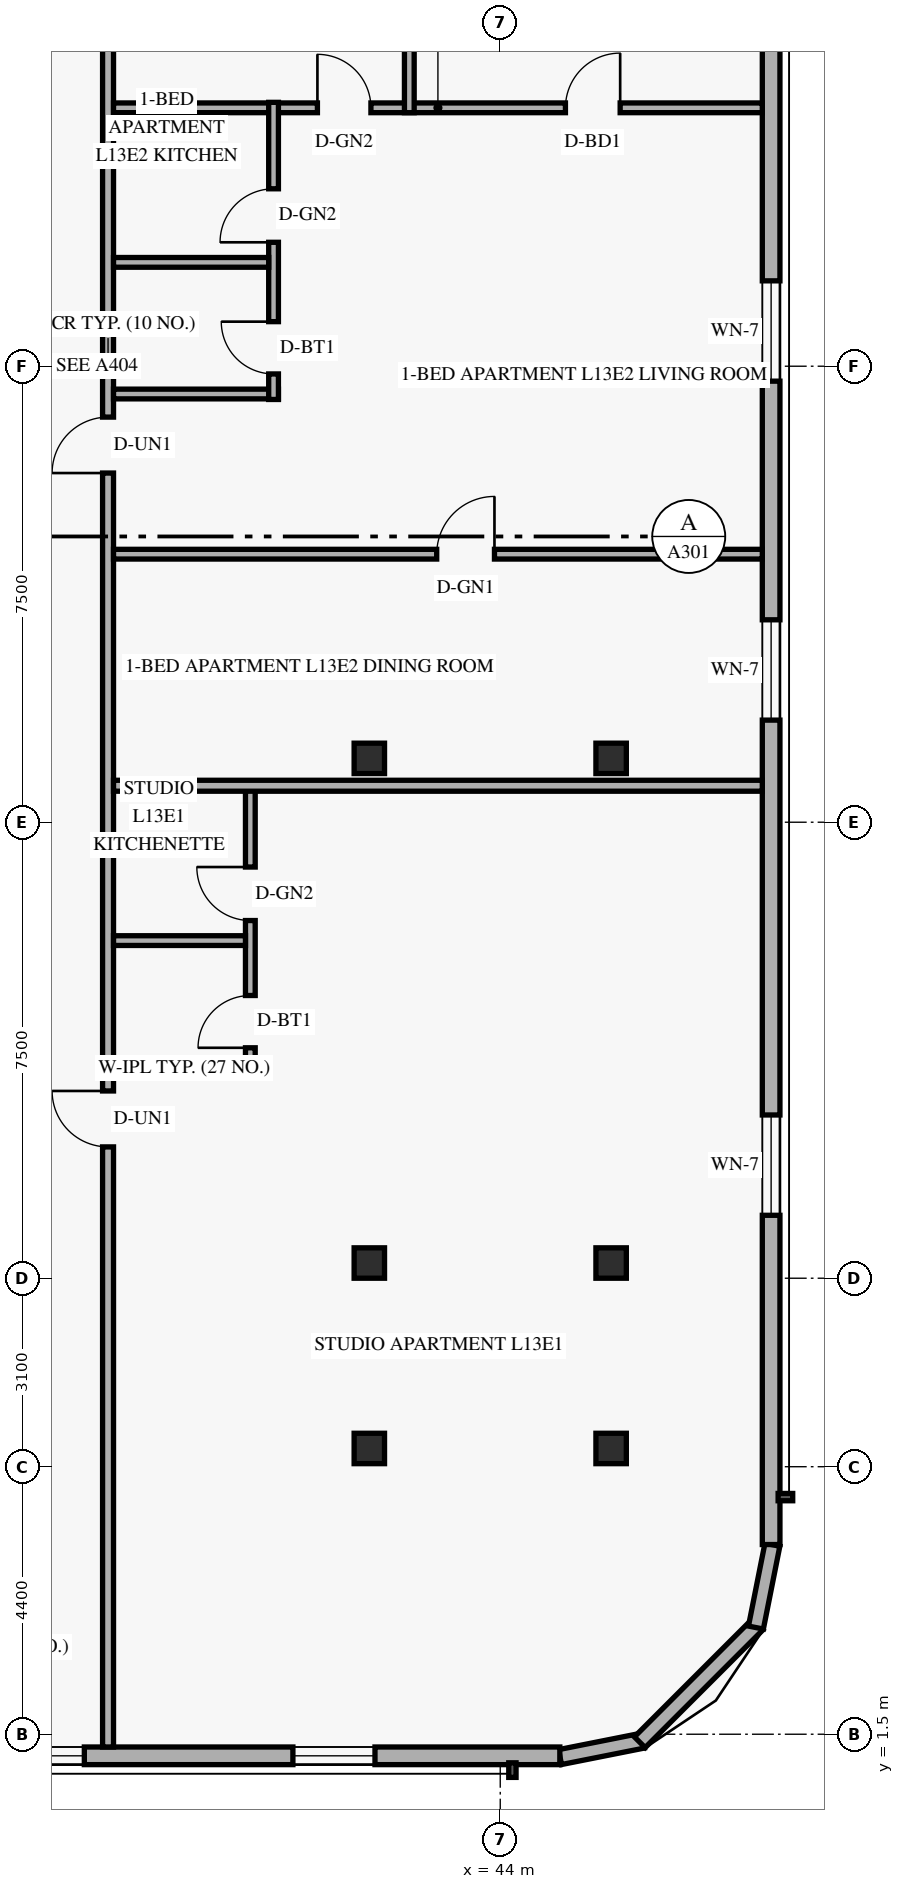
"""IFC4 building model, lengths in metres.
Left out: names, types, materials, properties, quantities, classifications, styles, units other than length and angle.
Written with IfcOpenShell. Run it as: python <this file> out.ifc"""

import sys

from ifc_helpers import new_model, si_unit, direction, frame, frame_2d, origin, origin_2d, place, context, subcontext, project, spatial, rectangle, hollow_rectangle, extrude, element, fill, save


model = new_model("IFC4")
c1 = context("Model", 3, precision=1e-05, world=origin(), true_north=direction((0.0, 1.0)))
c2 = subcontext(c1, "Body", "Model", "MODEL_VIEW")
j1 = project(units=[si_unit("LENGTHUNIT", "METRE"), si_unit("PLANEANGLEUNIT", "RADIAN")], contexts=[c1])
p1 = place(None, origin())
s1 = spatial("IfcSite", under=j1, at=p1, CompositionType="ELEMENT")
p2 = place(p1, origin())
s2 = spatial("IfcBuilding", under=s1, at=p2, CompositionType="ELEMENT")
p3 = place(p2, frame((0.0, 0.0, 52.8)))
s3 = spatial("IfcBuildingStorey", under=s2, at=p3, CompositionType="ELEMENT", Elevation=52.8)
for number, where, z_axis, x_axis in (
    (1, (41.784, 6.2, 0.0), (0.035, 0.0, 0.999), (0.0, 1.0, 0.0)),
    (2, (41.784, 9.25, 0.0), (0.035, 0.0, 0.999), (0.0, 1.0, 0.0)),
    (3, (41.784, 17.55, 0.0), (0.035, 0.0, 0.999), (0.0, 1.0, 0.0)),
):
    element("IfcColumn", number, at=place(p3, frame(where, z_axis=z_axis, x_axis=x_axis)), inside=s3, PredefinedType="COLUMN", context=c2, shape_type="SweptSolid", body=[
        extrude(hollow_rectangle(XDim=0.5, YDim=0.5, WallThickness=0.022, at=origin_2d()), origin(), (0.0, 0.0, 1.0), 3.602),
    ])
for number, where, z_axis, x_axis in (
    (4, (45.719, 6.2, 0.0), (0.058, 0.0, 0.998), (0.0, 1.0, 0.0)),
    (5, (45.719, 9.25, 0.0), (0.058, 0.0, 0.998), (0.0, 1.0, 0.0)),
    (6, (45.719, 17.55, 0.0), (0.058, 0.0, 0.998), (0.0, 1.0, 0.0)),
):
    element("IfcColumn", number, at=place(p3, frame(where, z_axis=z_axis, x_axis=x_axis)), inside=s3, PredefinedType="COLUMN", context=c2, shape_type="SweptSolid", body=[
        extrude(hollow_rectangle(XDim=0.5, YDim=0.5, WallThickness=0.022, at=origin_2d()), origin(), (0.0, 0.0, 1.0), 3.606),
    ])
p4 = place(p3, frame((44.983, 1.124, 0.0), z_axis=(0.0, 0.0, 1.0), x_axis=(0.980809899341, 0.19496651342, 0.0)))
e7 = element("IfcWall", 7, at=p4, inside=s3, PredefinedType="SOLIDWALL", context=c2, shape_type="SweptSolid", body=[
    extrude(rectangle(XDim=1.389, YDim=0.25, at=frame_2d((0.694, 0.0))), origin(), (0.0, 0.0, 1.0), 3.36),
])
p5 = place(p3, frame((46.295, 1.368, 0.0), z_axis=(0.0, 0.0, 1.0), x_axis=(0.707106781187, 0.707106781187, 0.0)))
e8 = element("IfcWall", 8, at=p5, inside=s3, PredefinedType="SOLIDWALL", context=c2, shape_type="SweptSolid", body=[
    extrude(rectangle(XDim=2.739, YDim=0.25, at=frame_2d((1.37, 0.0))), origin(), (0.0, 0.0, 1.0), 3.36),
])
p6 = place(p3, frame((48.205, 3.254, 0.0), z_axis=(0.0, 0.0, 1.0), x_axis=(0.19496651342, 0.980809899341, 0.0)))
e9 = element("IfcWall", 9, at=p6, inside=s3, PredefinedType="SOLIDWALL", context=c2, shape_type="SweptSolid", body=[
    extrude(rectangle(XDim=1.389, YDim=0.25, at=frame_2d((0.694, 0.0))), origin(), (0.0, 0.0, 1.0), 3.36),
])
p7 = place(p3, frame((5.42, 1.145, 0.0), z_axis=(0.0, 0.0, 1.0), x_axis=(1.0, 0.0, 0.0)))
e10 = element("IfcWall", 10, at=p7, inside=s3, PredefinedType="SOLIDWALL", context=c2, shape_type="SweptSolid", body=[
    extrude(rectangle(XDim=39.56, YDim=0.29, at=frame_2d((19.78, 0.0))), origin(), (0.0, 0.0, 1.0), 3.36),
])
p8 = place(p7, frame((2.765, 0.0, 0.85)))
e11 = element("IfcOpeningElement", 11, at=p8, cuts=e10, PredefinedType="OPENING", context=c2, shape_type="SweptSolid", body=[
    extrude(rectangle(XDim=1.35, YDim=1.55, at=frame_2d((0.675, 0.775))), frame((0.0, 0.155, 0.0), z_axis=(0.0, -1.0, 0.0), x_axis=(1.0, 0.0, 0.0)), (0.0, 0.0, 1.0), 0.31),
])
p9 = place(p7, frame((7.18, 0.0, 0.85)))
e12 = element("IfcOpeningElement", 12, at=p9, cuts=e10, PredefinedType="OPENING", context=c2, shape_type="SweptSolid", body=[
    extrude(rectangle(XDim=1.2, YDim=1.5, at=frame_2d((0.6, 0.75))), frame((0.0, 0.155, 0.0), z_axis=(0.0, -1.0, 0.0), x_axis=(1.0, 0.0, 0.0)), (0.0, 0.0, 1.0), 0.31),
])
p10 = place(p7, frame((12.482, 0.0, 0.85)))
e13 = element("IfcOpeningElement", 13, at=p10, cuts=e10, PredefinedType="OPENING", context=c2, shape_type="SweptSolid", body=[
    extrude(rectangle(XDim=1.35, YDim=1.55, at=frame_2d((0.675, 0.775))), frame((0.0, 0.155, 0.0), z_axis=(0.0, -1.0, 0.0), x_axis=(1.0, 0.0, 0.0)), (0.0, 0.0, 1.0), 0.31),
])
p11 = place(p7, frame((21.072, 0.0, 0.85)))
e14 = element("IfcOpeningElement", 14, at=p11, cuts=e10, PredefinedType="OPENING", context=c2, shape_type="SweptSolid", body=[
    extrude(rectangle(XDim=1.35, YDim=1.55, at=frame_2d((0.675, 0.775))), frame((0.0, 0.155, 0.0), z_axis=(0.0, -1.0, 0.0), x_axis=(1.0, 0.0, 0.0)), (0.0, 0.0, 1.0), 0.31),
])
p12 = place(p7, frame((27.255, 0.0, 0.85)))
e15 = element("IfcOpeningElement", 15, at=p12, cuts=e10, PredefinedType="OPENING", context=c2, shape_type="SweptSolid", body=[
    extrude(rectangle(XDim=1.35, YDim=1.55, at=frame_2d((0.675, 0.775))), frame((0.0, 0.155, 0.0), z_axis=(0.0, -1.0, 0.0), x_axis=(1.0, 0.0, 0.0)), (0.0, 0.0, 1.0), 0.31),
])
p13 = place(p7, frame((30.39, 0.0, 0.85)))
e16 = element("IfcOpeningElement", 16, at=p13, cuts=e10, PredefinedType="OPENING", context=c2, shape_type="SweptSolid", body=[
    extrude(rectangle(XDim=1.35, YDim=1.55, at=frame_2d((0.675, 0.775))), frame((0.0, 0.155, 0.0), z_axis=(0.0, -1.0, 0.0), x_axis=(1.0, 0.0, 0.0)), (0.0, 0.0, 1.0), 0.31),
])
p14 = place(p7, frame((35.17, 0.0, 0.85)))
e17 = element("IfcOpeningElement", 17, at=p14, cuts=e10, PredefinedType="OPENING", context=c2, shape_type="SweptSolid", body=[
    extrude(rectangle(XDim=1.35, YDim=1.55, at=frame_2d((0.675, 0.775))), frame((0.0, 0.155, 0.0), z_axis=(0.0, -1.0, 0.0), x_axis=(1.0, 0.0, 0.0)), (0.0, 0.0, 1.0), 0.31),
])
p15 = place(p3, frame((48.455, 4.62, 0.0), z_axis=(0.0, 0.0, 1.0), x_axis=(0.0, 1.0, 0.0)))
e18 = element("IfcWall", 18, at=p15, inside=s3, PredefinedType="SOLIDWALL", context=c2, shape_type="SweptSolid", body=[
    extrude(rectangle(XDim=38.76, YDim=0.29, at=frame_2d((19.38, 0.0))), origin(), (0.0, 0.0, 1.0), 3.36),
])
p16 = place(p15, frame((5.415, 0.0, 0.85)))
e19 = element("IfcOpeningElement", 19, at=p16, cuts=e18, PredefinedType="OPENING", context=c2, shape_type="SweptSolid", body=[
    extrude(rectangle(XDim=1.65, YDim=1.6, at=frame_2d((0.825, 0.8))), frame((0.0, 0.155, 0.0), z_axis=(0.0, -1.0, 0.0), x_axis=(1.0, 0.0, 0.0)), (0.0, 0.0, 1.0), 0.31),
])
p17 = place(p15, frame((13.559, 0.0, 0.85)))
e20 = element("IfcOpeningElement", 20, at=p17, cuts=e18, PredefinedType="OPENING", context=c2, shape_type="SweptSolid", body=[
    extrude(rectangle(XDim=1.65, YDim=1.6, at=frame_2d((0.825, 0.8))), frame((0.0, 0.155, 0.0), z_axis=(0.0, -1.0, 0.0), x_axis=(1.0, 0.0, 0.0)), (0.0, 0.0, 1.0), 0.31),
])
p18 = place(p15, frame((19.134, 0.0, 0.85)))
e21 = element("IfcOpeningElement", 21, at=p18, cuts=e18, PredefinedType="OPENING", context=c2, shape_type="SweptSolid", body=[
    extrude(rectangle(XDim=1.65, YDim=1.6, at=frame_2d((0.825, 0.8))), frame((0.0, 0.155, 0.0), z_axis=(0.0, -1.0, 0.0), x_axis=(1.0, 0.0, 0.0)), (0.0, 0.0, 1.0), 0.31),
])
p19 = place(p15, frame((25.05, 0.0, 0.85)))
e22 = element("IfcOpeningElement", 22, at=p19, cuts=e18, PredefinedType="OPENING", context=c2, shape_type="SweptSolid", body=[
    extrude(rectangle(XDim=1.65, YDim=1.6, at=frame_2d((0.825, 0.8))), frame((0.0, 0.155, 0.0), z_axis=(0.0, -1.0, 0.0), x_axis=(1.0, 0.0, 0.0)), (0.0, 0.0, 1.0), 0.31),
])
p20 = place(p15, frame((28.764, 0.0, 0.85)))
e23 = element("IfcOpeningElement", 23, at=p20, cuts=e18, PredefinedType="OPENING", context=c2, shape_type="SweptSolid", body=[
    extrude(rectangle(XDim=1.65, YDim=1.6, at=frame_2d((0.825, 0.8))), frame((0.0, 0.155, 0.0), z_axis=(0.0, -1.0, 0.0), x_axis=(1.0, 0.0, 0.0)), (0.0, 0.0, 1.0), 0.31),
])
p21 = place(p15, frame((33.824, 0.0, 0.85)))
e24 = element("IfcOpeningElement", 24, at=p21, cuts=e18, PredefinedType="OPENING", context=c2, shape_type="SweptSolid", body=[
    extrude(rectangle(XDim=1.65, YDim=1.6, at=frame_2d((0.825, 0.8))), frame((0.0, 0.155, 0.0), z_axis=(0.0, -1.0, 0.0), x_axis=(1.0, 0.0, 0.0)), (0.0, 0.0, 1.0), 0.31),
])
p22 = place(p3, frame((37.55, 1.29, 0.0), z_axis=(0.0, 0.0, 1.0), x_axis=(0.0, 1.0, 0.0)))
e25 = element("IfcWall", 25, at=p22, inside=s3, PredefinedType="STANDARD", context=c2, shape_type="SweptSolid", body=[
    extrude(rectangle(XDim=45.42, YDim=0.18, at=frame_2d((22.71, 0.0))), origin(), (0.0, 0.0, 1.0), 2.649),
])
p23 = place(p22, frame((9.87, 0.0, 0.0)))
e26 = element("IfcOpeningElement", 26, at=p23, cuts=e25, PredefinedType="OPENING", context=c2, shape_type="SweptSolid", body=[
    extrude(rectangle(XDim=0.92, YDim=2.15, at=frame_2d((0.46, 1.075))), frame((0.0, 0.1, 0.0), z_axis=(0.0, -1.0, 0.0), x_axis=(1.0, 0.0, 0.0)), (0.0, 0.0, 1.0), 0.2),
])
p24 = place(p22, frame((20.953, 0.0, 0.0)))
e27 = element("IfcOpeningElement", 27, at=p24, cuts=e25, PredefinedType="OPENING", context=c2, shape_type="SweptSolid", body=[
    extrude(rectangle(XDim=0.92, YDim=2.15, at=frame_2d((0.46, 1.075))), frame((0.0, 0.1, 0.0), z_axis=(0.0, -1.0, 0.0), x_axis=(1.0, 0.0, 0.0)), (0.0, 0.0, 1.0), 0.2),
])
p25 = place(p22, frame((35.534, 0.0, 0.0)))
e28 = element("IfcOpeningElement", 28, at=p25, cuts=e25, PredefinedType="OPENING", context=c2, shape_type="SweptSolid", body=[
    extrude(rectangle(XDim=0.92, YDim=2.15, at=frame_2d((0.46, 1.075))), frame((0.0, 0.1, 0.0), z_axis=(0.0, -1.0, 0.0), x_axis=(1.0, 0.0, 0.0)), (0.0, 0.0, 1.0), 0.2),
])
p26 = place(p3, frame((37.64, 12.46, 0.0), z_axis=(0.0, 0.0, 1.0), x_axis=(1.0, 0.0, 0.0)))
e29 = element("IfcWall", 29, at=p26, inside=s3, PredefinedType="PLUMBINGWALL", context=c2, shape_type="SweptSolid", body=[
    extrude(rectangle(XDim=2.33, YDim=0.16, at=frame_2d((1.165, 0.0))), origin(), (0.0, 0.0, 1.0), 3.36),
])
p27 = place(p3, frame((39.89, 12.37, 0.0), z_axis=(0.0, 0.0, 1.0), x_axis=(0.0, 1.0, 0.0)))
e30 = element("IfcWall", 30, at=p27, inside=s3, PredefinedType="PLUMBINGWALL", context=c2, shape_type="SweptSolid", body=[
    extrude(rectangle(XDim=4.73, YDim=0.16, at=frame_2d((2.365, 0.0))), origin(), (0.0, 0.0, 1.0), 2.932),
])
p28 = place(p27, frame((0.42, 0.0, 0.0)))
e31 = element("IfcOpeningElement", 31, at=p28, cuts=e30, PredefinedType="OPENING", context=c2, shape_type="SweptSolid", body=[
    extrude(rectangle(XDim=0.86, YDim=2.12, at=frame_2d((0.43, 1.06))), frame((0.0, 0.09, 0.0), z_axis=(0.0, -1.0, 0.0), x_axis=(1.0, 0.0, 0.0)), (0.0, 0.0, 1.0), 0.18),
])
p29 = place(p27, frame((2.513, 0.0, 0.0)))
e32 = element("IfcOpeningElement", 32, at=p29, cuts=e30, PredefinedType="OPENING", context=c2, shape_type="SweptSolid", body=[
    extrude(rectangle(XDim=0.88, YDim=2.12, at=frame_2d((0.44, 1.06))), frame((0.0, 0.09, 0.0), z_axis=(0.0, -1.0, 0.0), x_axis=(1.0, 0.0, 0.0)), (0.0, 0.0, 1.0), 0.18),
])
p30 = place(p3, frame((37.64, 14.553, 0.0), z_axis=(0.0, 0.0, 1.0), x_axis=(1.0, 0.0, 0.0)))
e33 = element("IfcWall", 33, at=p30, inside=s3, PredefinedType="PLUMBINGWALL", context=c2, shape_type="SweptSolid", body=[
    extrude(rectangle(XDim=2.17, YDim=0.16, at=frame_2d((1.085, 0.0))), origin(), (0.0, 0.0, 1.0), 3.36),
])
p31 = place(p3, frame((37.64, 17.1, 0.0), z_axis=(0.0, 0.0, 1.0), x_axis=(1.0, 0.0, 0.0)))
e34 = element("IfcWall", 34, at=p31, inside=s3, PredefinedType="PARTITIONING", context=c2, shape_type="SweptSolid", body=[
    extrude(rectangle(XDim=10.67, YDim=0.18, at=frame_2d((5.335, 0.0))), origin(), (0.0, 0.0, 1.0), 2.649),
])
p32 = place(p3, frame((37.64, 28.25, 0.0), z_axis=(0.0, 0.0, 1.0), x_axis=(1.0, 0.0, 0.0)))
e35 = element("IfcWall", 35, at=p32, inside=s3, PredefinedType="PARTITIONING", context=c2, shape_type="SweptSolid", body=[
    extrude(rectangle(XDim=10.67, YDim=0.16, at=frame_2d((5.335, 0.0))), origin(), (0.0, 0.0, 1.0), 2.649),
])
p33 = place(p32, frame((3.353, 0.0, 0.0)))
e36 = element("IfcOpeningElement", 36, at=p33, cuts=e35, PredefinedType="OPENING", context=c2, shape_type="SweptSolid", body=[
    extrude(rectangle(XDim=0.88, YDim=2.12, at=frame_2d((0.44, 1.06))), frame((0.0, 0.09, 0.0), z_axis=(0.0, -1.0, 0.0), x_axis=(1.0, 0.0, 0.0)), (0.0, 0.0, 1.0), 0.18),
])
p34 = place(p32, frame((7.432, 0.0, 0.0)))
e37 = element("IfcOpeningElement", 37, at=p34, cuts=e35, PredefinedType="OPENING", context=c2, shape_type="SweptSolid", body=[
    extrude(rectangle(XDim=0.9, YDim=2.14, at=frame_2d((0.45, 1.07))), frame((0.0, 0.09, 0.0), z_axis=(0.0, -1.0, 0.0), x_axis=(1.0, 0.0, 0.0)), (0.0, 0.0, 1.0), 0.18),
])
p35 = place(p3, frame((37.64, 23.543, 0.0), z_axis=(0.0, 0.0, 1.0), x_axis=(1.0, 0.0, 0.0)))
e38 = element("IfcWall", 38, at=p35, inside=s3, PredefinedType="PLUMBINGWALL", context=c2, shape_type="SweptSolid", body=[
    extrude(rectangle(XDim=2.712, YDim=0.16, at=frame_2d((1.356, 0.0))), origin(), (0.0, 0.0, 1.0), 3.36),
])
p36 = place(p3, frame((40.272, 23.453, 0.0), z_axis=(0.0, 0.0, 1.0), x_axis=(0.0, 1.0, 0.0)))
e39 = element("IfcWall", 39, at=p36, inside=s3, PredefinedType="PLUMBINGWALL", context=c2, shape_type="SweptSolid", body=[
    extrude(rectangle(XDim=4.887, YDim=0.16, at=frame_2d((2.444, 0.0))), origin(), (0.0, 0.0, 1.0), 3.36),
])
p37 = place(p36, frame((0.42, 0.0, 0.0)))
e40 = element("IfcOpeningElement", 40, at=p37, cuts=e39, PredefinedType="OPENING", context=c2, shape_type="SweptSolid", body=[
    extrude(rectangle(XDim=0.86, YDim=2.12, at=frame_2d((0.43, 1.06))), frame((0.0, 0.09, 0.0), z_axis=(0.0, -1.0, 0.0), x_axis=(1.0, 0.0, 0.0)), (0.0, 0.0, 1.0), 0.18),
])
p38 = place(p36, frame((2.585, 0.0, 0.0)))
e41 = element("IfcOpeningElement", 41, at=p38, cuts=e39, PredefinedType="OPENING", context=c2, shape_type="SweptSolid", body=[
    extrude(rectangle(XDim=0.88, YDim=2.12, at=frame_2d((0.44, 1.06))), frame((0.0, 0.09, 0.0), z_axis=(0.0, -1.0, 0.0), x_axis=(1.0, 0.0, 0.0)), (0.0, 0.0, 1.0), 0.18),
])
p39 = place(p3, frame((37.64, 25.708, 0.0), z_axis=(0.0, 0.0, 1.0), x_axis=(1.0, 0.0, 0.0)))
e42 = element("IfcWall", 42, at=p39, inside=s3, PredefinedType="PLUMBINGWALL", context=c2, shape_type="SweptSolid", body=[
    extrude(rectangle(XDim=2.552, YDim=0.16, at=frame_2d((1.276, 0.0))), origin(), (0.0, 0.0, 1.0), 3.36),
])
p40 = place(p3, frame((37.64, 20.908, 0.0), z_axis=(0.0, 0.0, 1.0), x_axis=(1.0, 0.0, 0.0)))
e43 = element("IfcWall", 43, at=p40, inside=s3, PredefinedType="PARTITIONING", context=c2, shape_type="SweptSolid", body=[
    extrude(rectangle(XDim=10.67, YDim=0.16, at=frame_2d((5.335, 0.0))), origin(), (0.0, 0.0, 1.0), 2.649),
])
p41 = place(p40, frame((5.315, 0.0, 0.0)))
e44 = element("IfcOpeningElement", 44, at=p41, cuts=e43, PredefinedType="OPENING", context=c2, shape_type="SweptSolid", body=[
    extrude(rectangle(XDim=0.95, YDim=2.15, at=frame_2d((0.475, 1.075))), frame((0.0, 0.09, 0.0), z_axis=(0.0, -1.0, 0.0), x_axis=(1.0, 0.0, 0.0)), (0.0, 0.0, 1.0), 0.18),
])
p42 = place(p3, frame((42.504, 28.17, 0.0), z_axis=(0.0, 0.0, 1.0), x_axis=(0.0, 1.0, 0.0)))
e45 = element("IfcWall", 45, at=p42, inside=s3, PredefinedType="PARTITIONING", context=c2, shape_type="SweptSolid", body=[
    extrude(rectangle(XDim=4.96, YDim=0.16, at=frame_2d((2.48, 0.0))), origin(), (0.0, 0.0, 1.0), 2.649),
])
p43 = place(p13, origin())
e46 = element("IfcWindow", 46, at=p43, inside=s3, PartitioningType="SINGLE_PANEL", PredefinedType="WINDOW", context=c2, shape_type="SweptSolid", body=[
    extrude(rectangle(XDim=1.35, YDim=1.55, at=frame_2d((0.675, 0.775))), frame((0.0, 0.03, 0.0), z_axis=(0.0, -1.0, 0.0), x_axis=(1.0, 0.0, 0.0)), (0.0, 0.0, 1.0), 0.06),
])
fill(e16, e46)
p44 = place(p14, origin())
e47 = element("IfcWindow", 47, at=p44, inside=s3, PartitioningType="SINGLE_PANEL", PredefinedType="WINDOW", context=c2, shape_type="SweptSolid", body=[
    extrude(rectangle(XDim=1.35, YDim=1.55, at=frame_2d((0.675, 0.775))), frame((0.0, 0.03, 0.0), z_axis=(0.0, -1.0, 0.0), x_axis=(1.0, 0.0, 0.0)), (0.0, 0.0, 1.0), 0.06),
])
fill(e17, e47)
p45 = place(p16, origin())
e48 = element("IfcWindow", 48, at=p45, inside=s3, PartitioningType="SINGLE_PANEL", PredefinedType="WINDOW", context=c2, shape_type="SweptSolid", body=[
    extrude(rectangle(XDim=1.65, YDim=1.6, at=frame_2d((0.825, 0.8))), frame((0.0, 0.03, 0.0), z_axis=(0.0, -1.0, 0.0), x_axis=(1.0, 0.0, 0.0)), (0.0, 0.0, 1.0), 0.06),
])
fill(e19, e48)
p46 = place(p17, origin())
e49 = element("IfcWindow", 49, at=p46, inside=s3, PartitioningType="SINGLE_PANEL", PredefinedType="WINDOW", context=c2, shape_type="SweptSolid", body=[
    extrude(rectangle(XDim=1.65, YDim=1.6, at=frame_2d((0.825, 0.8))), frame((0.0, 0.03, 0.0), z_axis=(0.0, -1.0, 0.0), x_axis=(1.0, 0.0, 0.0)), (0.0, 0.0, 1.0), 0.06),
])
fill(e20, e49)
p47 = place(p18, origin())
e50 = element("IfcWindow", 50, at=p47, inside=s3, PartitioningType="SINGLE_PANEL", PredefinedType="WINDOW", context=c2, shape_type="SweptSolid", body=[
    extrude(rectangle(XDim=1.65, YDim=1.6, at=frame_2d((0.825, 0.8))), frame((0.0, 0.03, 0.0), z_axis=(0.0, -1.0, 0.0), x_axis=(1.0, 0.0, 0.0)), (0.0, 0.0, 1.0), 0.06),
])
fill(e21, e50)
p48 = place(p23, origin())
e51 = element("IfcDoor", 51, at=p48, inside=s3, OperationType="SINGLE_SWING_RIGHT", PredefinedType="DOOR", context=c2, shape_type="SweptSolid", body=[
    extrude(rectangle(XDim=0.92, YDim=2.15, at=frame_2d((0.46, 1.075))), frame((0.0, 0.025, 0.0), z_axis=(0.0, -1.0, 0.0), x_axis=(1.0, 0.0, 0.0)), (0.0, 0.0, 1.0), 0.05),
])
fill(e26, e51)
p49 = place(p28, origin())
e52 = element("IfcDoor", 52, at=p49, inside=s3, OperationType="SINGLE_SWING_LEFT", PredefinedType="DOOR", context=c2, shape_type="SweptSolid", body=[
    extrude(rectangle(XDim=0.86, YDim=2.12, at=frame_2d((0.43, 1.06))), frame((0.0, 0.025, 0.0), z_axis=(0.0, -1.0, 0.0), x_axis=(1.0, 0.0, 0.0)), (0.0, 0.0, 1.0), 0.05),
])
fill(e31, e52)
p50 = place(p29, origin())
e53 = element("IfcDoor", 53, at=p50, inside=s3, OperationType="SINGLE_SWING_RIGHT", PredefinedType="DOOR", context=c2, shape_type="SweptSolid", body=[
    extrude(rectangle(XDim=0.88, YDim=2.12, at=frame_2d((0.44, 1.06))), frame((0.0, 0.025, 0.0), z_axis=(0.0, -1.0, 0.0), x_axis=(1.0, 0.0, 0.0)), (0.0, 0.0, 1.0), 0.05),
])
fill(e32, e53)
p51 = place(p41, origin())
e54 = element("IfcDoor", 54, at=p51, inside=s3, OperationType="SINGLE_SWING_RIGHT", PredefinedType="DOOR", context=c2, shape_type="SweptSolid", body=[
    extrude(rectangle(XDim=0.95, YDim=2.15, at=frame_2d((0.475, 1.075))), frame((0.0, 0.025, 0.0), z_axis=(0.0, -1.0, 0.0), x_axis=(1.0, 0.0, 0.0)), (0.0, 0.0, 1.0), 0.05),
])
fill(e44, e54)
p52 = place(p24, origin())
e55 = element("IfcDoor", 55, at=p52, inside=s3, OperationType="SINGLE_SWING_LEFT", PredefinedType="DOOR", context=c2, shape_type="SweptSolid", body=[
    extrude(rectangle(XDim=0.92, YDim=2.15, at=frame_2d((0.46, 1.075))), frame((0.0, 0.025, 0.0), z_axis=(0.0, -1.0, 0.0), x_axis=(1.0, 0.0, 0.0)), (0.0, 0.0, 1.0), 0.05),
])
fill(e27, e55)
p53 = place(p37, origin())
e56 = element("IfcDoor", 56, at=p53, inside=s3, OperationType="SINGLE_SWING_RIGHT", PredefinedType="DOOR", context=c2, shape_type="SweptSolid", body=[
    extrude(rectangle(XDim=0.86, YDim=2.12, at=frame_2d((0.43, 1.06))), frame((0.0, 0.025, 0.0), z_axis=(0.0, -1.0, 0.0), x_axis=(1.0, 0.0, 0.0)), (0.0, 0.0, 1.0), 0.05),
])
fill(e40, e56)
p54 = place(p38, origin())
e57 = element("IfcDoor", 57, at=p54, inside=s3, OperationType="SINGLE_SWING_LEFT", PredefinedType="DOOR", context=c2, shape_type="SweptSolid", body=[
    extrude(rectangle(XDim=0.88, YDim=2.12, at=frame_2d((0.44, 1.06))), frame((0.0, 0.025, 0.0), z_axis=(0.0, -1.0, 0.0), x_axis=(1.0, 0.0, 0.0)), (0.0, 0.0, 1.0), 0.05),
])
fill(e41, e57)
p55 = place(p33, origin())
e58 = element("IfcDoor", 58, at=p55, inside=s3, OperationType="SINGLE_SWING_LEFT", PredefinedType="DOOR", context=c2, shape_type="SweptSolid", body=[
    extrude(rectangle(XDim=0.88, YDim=2.12, at=frame_2d((0.44, 1.06))), frame((0.0, 0.025, 0.0), z_axis=(0.0, -1.0, 0.0), x_axis=(1.0, 0.0, 0.0)), (0.0, 0.0, 1.0), 0.05),
])
fill(e36, e58)
p56 = place(p34, origin())
e59 = element("IfcDoor", 59, at=p56, inside=s3, OperationType="SINGLE_SWING_RIGHT", PredefinedType="DOOR", context=c2, shape_type="SweptSolid", body=[
    extrude(rectangle(XDim=0.9, YDim=2.14, at=frame_2d((0.45, 1.07))), frame((0.0, 0.025, 0.0), z_axis=(0.0, -1.0, 0.0), x_axis=(1.0, 0.0, 0.0)), (0.0, 0.0, 1.0), 0.05),
])
fill(e37, e59)
save(model, sys.argv[1])
